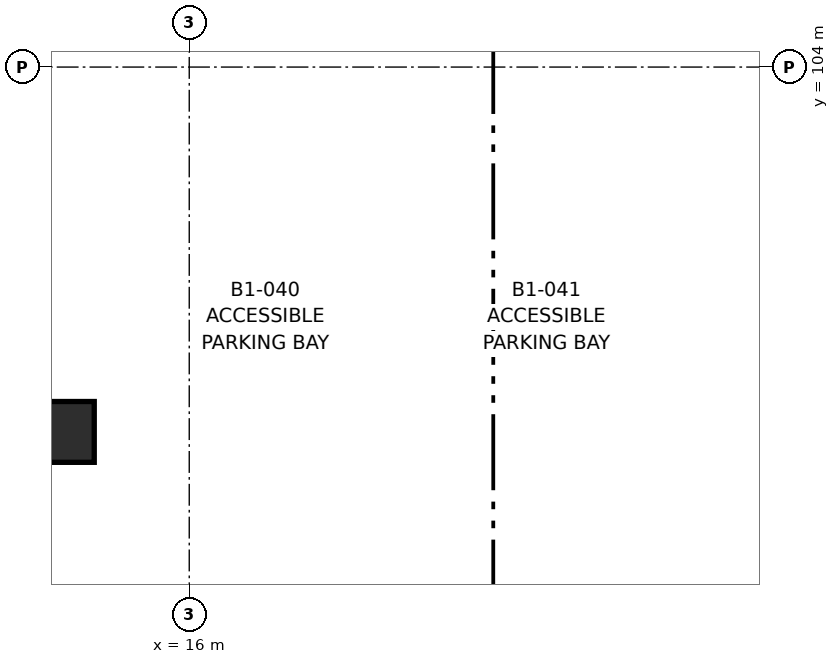
"""IFC4 building model, lengths in metres.
Left out: names, types, materials, properties, quantities, classifications, styles, units other than length and angle.
Written with IfcOpenShell. Run it as: python <this file> out.ifc"""

import sys

from ifc_helpers import new_model, si_unit, direction, frame, origin, origin_2d, place, context, subcontext, project, spatial, rectangle, extrude, element, save


model = new_model("IFC4")
c1 = context("Model", 3, precision=1e-05, world=origin(), true_north=direction((0.0, 1.0)))
c2 = subcontext(c1, "Body", "Model", "MODEL_VIEW")
j1 = project(units=[si_unit("LENGTHUNIT", "METRE"), si_unit("PLANEANGLEUNIT", "RADIAN")], contexts=[c1])
p1 = place(None, origin())
s1 = spatial("IfcSite", under=j1, at=p1, CompositionType="ELEMENT")
p2 = place(p1, origin())
s2 = spatial("IfcBuilding", under=s1, at=p2, CompositionType="ELEMENT")
p3 = place(p2, frame((0.0, 0.0, -3.84)))
s3 = spatial("IfcBuildingStorey", under=s2, at=p3, CompositionType="ELEMENT", Elevation=-3.84)
p4 = place(p3, frame((14.35, 99.2, 0.0), z_axis=(0.0, 0.0, 1.0), x_axis=(1.0, 0.0, 0.0)))
e1 = element("IfcColumn", 1, at=p4, inside=s3, PredefinedType="COLUMN", context=c2, shape_type="SweptSolid", body=[
    extrude(rectangle(XDim=0.8, YDim=0.8, at=origin_2d()), origin(), (0.0, 0.0, 1.0), 3.84),
])
save(model, sys.argv[1])
